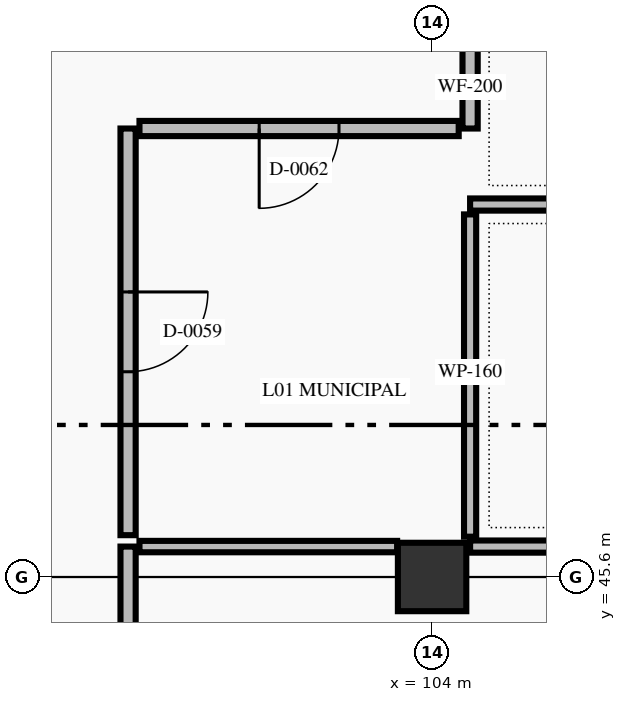
"""IFC4 building model, lengths in metres.
Left out: names, types, materials, properties, quantities, classifications, styles, units other than length and angle.
Written with IfcOpenShell. Run it as: python <this file> out.ifc"""

import sys

from ifc_helpers import new_model, si_unit, direction, frame, frame_2d, origin, origin_2d, place, context, subcontext, project, spatial, rectangle, extrude, element, fill, save


model = new_model("IFC4")
c1 = context("Model", 3, precision=1e-05, world=origin(), true_north=direction((0.0, 1.0)))
c2 = subcontext(c1, "Body", "Model", "MODEL_VIEW")
j1 = project(units=[si_unit("LENGTHUNIT", "METRE"), si_unit("PLANEANGLEUNIT", "RADIAN")], contexts=[c1])
p1 = place(None, origin())
s1 = spatial("IfcSite", under=j1, at=p1, CompositionType="ELEMENT")
p2 = place(p1, origin())
s2 = spatial("IfcBuilding", under=s1, at=p2, CompositionType="ELEMENT")
p3 = place(p2, origin())
s3 = spatial("IfcBuildingStorey", under=s2, at=p3, CompositionType="ELEMENT", Elevation=0.0)
p4 = place(p3, frame((104.0, 45.6, 0.0), z_axis=(0.0, 0.0, 1.0), x_axis=(1.0, 0.0, 0.0)))
e1 = element("IfcColumn", 1, at=p4, inside=s3, PredefinedType="COLUMN", context=c2, shape_type="SweptSolid", body=[
    extrude(rectangle(XDim=0.9, YDim=0.9, at=origin_2d()), origin(), (0.0, 0.0, 1.0), 5.4),
])
p5 = place(p3, frame((104.5, 50.5, 0.0), z_axis=(0.0, 0.0, 1.0), x_axis=(1.0, 0.0, 0.0)))
e2 = element("IfcWall", 2, at=p5, inside=s3, PredefinedType="PARTITIONING", context=c2, shape_type="SweptSolid", body=[
    extrude(rectangle(XDim=7.5, YDim=0.16, at=frame_2d((3.75, 0.0))), origin(), (0.0, 0.0, 1.0), 5.16),
])
p6 = place(p3, frame((111.565, 46.0, 0.0), z_axis=(0.0, 0.0, 1.0), x_axis=(-1.0, 0.0, 0.0)))
e3 = element("IfcWall", 3, at=p6, inside=s3, PredefinedType="PARTITIONING", context=c2, shape_type="SweptSolid", body=[
    extrude(rectangle(XDim=7.065, YDim=0.16, at=frame_2d((3.532, 0.0))), origin(), (0.0, 0.0, 1.0), 5.16),
])
p7 = place(p3, frame((104.5, 46.13, 0.0), z_axis=(0.0, 0.0, 1.0), x_axis=(0.0, 1.0, 0.0)))
e4 = element("IfcWall", 4, at=p7, inside=s3, PredefinedType="PARTITIONING", context=c2, shape_type="SweptSolid", body=[
    extrude(rectangle(XDim=4.24, YDim=0.16, at=frame_2d((2.12, 0.0))), origin(), (0.0, 0.0, 1.0), 5.16),
])
p8 = place(p3, frame((104.5, 51.5, 0.0), z_axis=(0.0, 0.0, 1.0), x_axis=(0.0, 1.0, 0.0)))
e5 = element("IfcWall", 5, at=p8, inside=s3, PredefinedType="STANDARD", context=c2, shape_type="SweptSolid", body=[
    extrude(rectangle(XDim=3.37, YDim=0.2, at=frame_2d((1.685, 0.0))), origin(), (0.0, 0.0, 1.0), 5.16),
])
p9 = place(p3, frame((100.0, 30.4, 0.0), z_axis=(0.0, 0.0, 1.0), x_axis=(0.0, 1.0, 0.0)))
e6 = element("IfcWall", 6, at=p9, inside=s3, PredefinedType="STANDARD", context=c2, shape_type="SweptSolid", body=[
    extrude(rectangle(XDim=15.6, YDim=0.2, at=frame_2d((7.8, 0.0))), origin(), (0.0, 0.0, 1.0), 4.66),
])
p10 = place(p9, frame((6.85, 0.0, 0.0)))
e7 = element("IfcOpeningElement", 7, at=p10, cuts=e6, PredefinedType="OPENING", context=c2, shape_type="SweptSolid", body=[
    extrude(rectangle(XDim=1.9, YDim=2.4, at=frame_2d((0.95, 1.2))), frame((0.0, 0.11, 0.0), z_axis=(0.0, -1.0, 0.0), x_axis=(1.0, 0.0, 0.0)), (0.0, 0.0, 1.0), 0.22),
])
p11 = place(p3, frame((100.15, 46.0, 0.0), z_axis=(0.0, 0.0, 1.0), x_axis=(1.0, 0.0, 0.0)))
e8 = element("IfcWall", 8, at=p11, inside=s3, PredefinedType="PARTITIONING", context=c2, shape_type="SweptSolid", body=[
    extrude(rectangle(XDim=3.39, YDim=0.15, at=frame_2d((1.695, 0.0))), origin(), (0.0, 0.0, 1.0), 5.16),
])
p12 = place(p3, frame((100.0, 51.5, 0.0), z_axis=(0.0, 0.0, 1.0), x_axis=(0.0, -1.0, 0.0)))
e9 = element("IfcWall", 9, at=p12, inside=s3, PredefinedType="STANDARD", context=c2, shape_type="SweptSolid", body=[
    extrude(rectangle(XDim=5.35, YDim=0.2, at=frame_2d((2.675, 0.0))), origin(), (0.0, 0.0, 1.0), 4.66),
])
p13 = place(p12, frame((2.15, 0.0, 0.0)))
e10 = element("IfcOpeningElement", 10, at=p13, cuts=e9, PredefinedType="OPENING", context=c2, shape_type="SweptSolid", body=[
    extrude(rectangle(XDim=1.05, YDim=2.15, at=frame_2d((0.525, 1.075))), frame((0.0, 0.11, 0.0), z_axis=(0.0, -1.0, 0.0), x_axis=(1.0, 0.0, 0.0)), (0.0, 0.0, 1.0), 0.22),
])
p14 = place(p3, frame((104.35, 51.5, 0.0), z_axis=(0.0, 0.0, 1.0), x_axis=(-1.0, 0.0, 0.0)))
e11 = element("IfcWall", 11, at=p14, inside=s3, PredefinedType="STANDARD", context=c2, shape_type="SweptSolid", body=[
    extrude(rectangle(XDim=4.2, YDim=0.2, at=frame_2d((2.1, 0.0))), origin(), (0.0, 0.0, 1.0), 5.16),
])
p15 = place(p14, frame((1.575, 0.0, 0.0)))
e12 = element("IfcOpeningElement", 12, at=p15, cuts=e11, PredefinedType="OPENING", context=c2, shape_type="SweptSolid", body=[
    extrude(rectangle(XDim=1.05, YDim=2.15, at=frame_2d((0.525, 1.075))), frame((0.0, 0.11, 0.0), z_axis=(0.0, -1.0, 0.0), x_axis=(1.0, 0.0, 0.0)), (0.0, 0.0, 1.0), 0.22),
])
p16 = place(p13, origin())
e13 = element("IfcDoor", 13, at=p16, inside=s3, OperationType="SINGLE_SWING_LEFT", PredefinedType="DOOR", context=c2, shape_type="SweptSolid", body=[
    extrude(rectangle(XDim=1.05, YDim=2.15, at=frame_2d((0.525, 1.075))), frame((0.0, 0.025, 0.0), z_axis=(0.0, -1.0, 0.0), x_axis=(1.0, 0.0, 0.0)), (0.0, 0.0, 1.0), 0.05),
])
fill(e10, e13)
p17 = place(p15, origin())
e14 = element("IfcDoor", 14, at=p17, inside=s3, OperationType="SINGLE_SWING_RIGHT", PredefinedType="DOOR", context=c2, shape_type="SweptSolid", body=[
    extrude(rectangle(XDim=1.05, YDim=2.15, at=frame_2d((0.525, 1.075))), frame((0.0, 0.025, 0.0), z_axis=(0.0, -1.0, 0.0), x_axis=(1.0, 0.0, 0.0)), (0.0, 0.0, 1.0), 0.05),
])
fill(e12, e14)
save(model, sys.argv[1])
